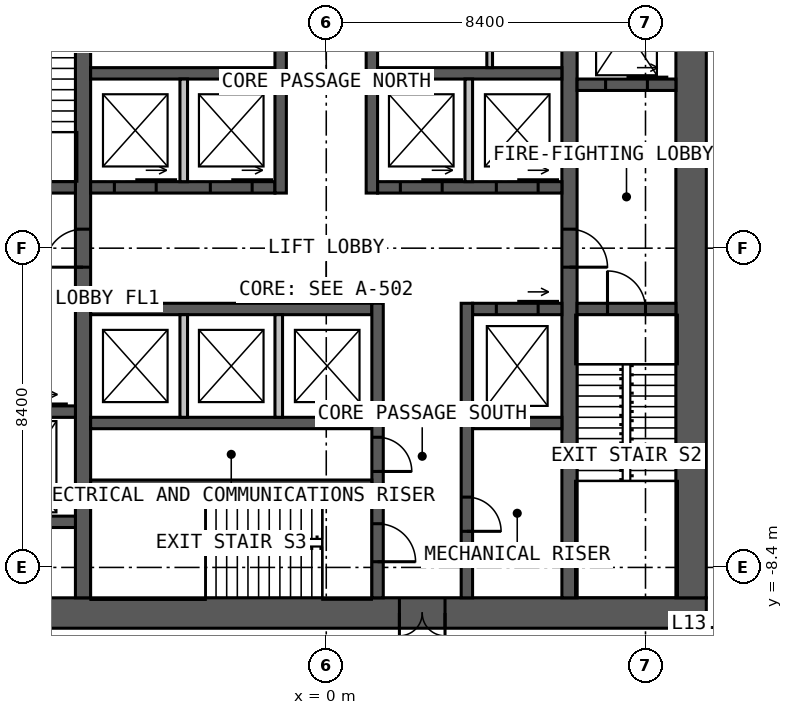
"""IFC4 building model, lengths in metres.
Left out: names, types, materials, properties, quantities, classifications, styles, units other than length and angle.
Written with IfcOpenShell. Run it as: python <this file> out.ifc"""

import sys

from ifc_helpers import new_model, si_unit, direction, frame, frame_2d, origin, place, context, subcontext, project, spatial, rectangle, extrude, element, fill, save


model = new_model("IFC4")
c1 = context("Model", 3, precision=1e-05, world=origin(), true_north=direction((0.0, 1.0)))
c2 = subcontext(c1, "Body", "Model", "MODEL_VIEW")
j1 = project(units=[si_unit("LENGTHUNIT", "METRE"), si_unit("PLANEANGLEUNIT", "RADIAN")], contexts=[c1])
p1 = place(None, origin())
s1 = spatial("IfcSite", under=j1, at=p1, CompositionType="ELEMENT")
p2 = place(p1, origin())
s2 = spatial("IfcBuilding", under=s1, at=p2, CompositionType="ELEMENT")
p3 = place(p2, frame((0.0, 0.0, 57.0)))
s3 = spatial("IfcBuildingStorey", under=s2, at=p3, CompositionType="ELEMENT", Elevation=57.0)
p4 = place(p3, frame((10.0, -9.6, 0.0), z_axis=(0.0, 0.0, 1.0), x_axis=(-1.0, 0.0, 0.0)))
e1 = element("IfcWall", 1, at=p4, inside=s3, PredefinedType="SOLIDWALL", context=c2, shape_type="SweptSolid", body=[
    extrude(rectangle(XDim=20.0, YDim=0.8, at=frame_2d((10.0, 0.0))), origin(), (0.0, 0.0, 1.0), 4.0),
])
p5 = place(p4, frame((6.875, 0.0, 0.0)))
e2 = element("IfcOpeningElement", 2, at=p5, cuts=e1, PredefinedType="OPENING", context=c2, shape_type="SweptSolid", body=[
    extrude(rectangle(XDim=1.2, YDim=2.2, at=frame_2d((0.6, 1.1))), frame((0.0, 0.41, 0.0), z_axis=(0.0, -1.0, 0.0), x_axis=(1.0, 0.0, 0.0)), (0.0, 0.0, 1.0), 0.82),
])
p6 = place(p3, frame((9.6, -9.2, 0.0), z_axis=(0.0, 0.0, 1.0), x_axis=(0.0, 1.0, 0.0)))
e3 = element("IfcWall", 3, at=p6, inside=s3, PredefinedType="SOLIDWALL", context=c2, shape_type="SweptSolid", body=[
    extrude(rectangle(XDim=18.4, YDim=0.8, at=frame_2d((9.2, 0.0))), origin(), (0.0, 0.0, 1.0), 4.0),
])
p7 = place(p3, frame((-6.4, -9.2, 0.0), z_axis=(0.0, 0.0, 1.0), x_axis=(0.0, 1.0, 0.0)))
e4 = element("IfcWall", 4, at=p7, inside=s3, PredefinedType="SOLIDWALL", context=c2, shape_type="SweptSolid", body=[
    extrude(rectangle(XDim=18.4, YDim=0.4, at=frame_2d((9.2, 0.0))), origin(), (0.0, 0.0, 1.0), 4.0),
])
p8 = place(p7, frame((8.7, 0.0, 0.0)))
e5 = element("IfcOpeningElement", 5, at=p8, cuts=e4, PredefinedType="OPENING", context=c2, shape_type="SweptSolid", body=[
    extrude(rectangle(XDim=1.0, YDim=2.2, at=frame_2d((0.5, 1.1))), frame((0.0, 0.21, 0.0), z_axis=(0.0, -1.0, 0.0), x_axis=(1.0, 0.0, 0.0)), (0.0, 0.0, 1.0), 0.42),
])
p9 = place(p3, frame((6.4, 9.2, 0.0), z_axis=(0.0, 0.0, 1.0), x_axis=(0.0, -1.0, 0.0)))
e6 = element("IfcWall", 6, at=p9, inside=s3, PredefinedType="SOLIDWALL", context=c2, shape_type="SweptSolid", body=[
    extrude(rectangle(XDim=18.4, YDim=0.4, at=frame_2d((9.2, 0.0))), origin(), (0.0, 0.0, 1.0), 4.0),
])
p10 = place(p9, frame((8.7, 0.0, 0.0)))
e7 = element("IfcOpeningElement", 7, at=p10, cuts=e6, PredefinedType="OPENING", context=c2, shape_type="SweptSolid", body=[
    extrude(rectangle(XDim=1.0, YDim=2.2, at=frame_2d((0.5, 1.1))), frame((0.0, 0.21, 0.0), z_axis=(0.0, -1.0, 0.0), x_axis=(1.0, 0.0, 0.0)), (0.0, 0.0, 1.0), 0.42),
])
p11 = place(p3, frame((-6.2, 1.6, 0.0), z_axis=(0.0, 0.0, 1.0), x_axis=(1.0, 0.0, 0.0)))
e8 = element("IfcWall", 8, at=p11, inside=s3, PredefinedType="SOLIDWALL", context=c2, shape_type="SweptSolid", body=[
    extrude(rectangle(XDim=4.85, YDim=0.3, at=frame_2d((2.425, 0.0))), origin(), (0.0, 0.0, 1.0), 4.0),
])
p12 = place(p11, frame((0.625, 0.0, 0.0)))
e9 = element("IfcOpeningElement", 9, at=p12, cuts=e8, PredefinedType="OPENING", context=c2, shape_type="SweptSolid", body=[
    extrude(rectangle(XDim=1.1, YDim=2.2, at=frame_2d((0.55, 1.1))), frame((0.0, 0.16, 0.0), z_axis=(0.0, -1.0, 0.0), x_axis=(1.0, 0.0, 0.0)), (0.0, 0.0, 1.0), 0.32),
])
p13 = place(p11, frame((3.15, 0.0, 0.0)))
e10 = element("IfcOpeningElement", 10, at=p13, cuts=e8, PredefinedType="OPENING", context=c2, shape_type="SweptSolid", body=[
    extrude(rectangle(XDim=1.1, YDim=2.2, at=frame_2d((0.55, 1.1))), frame((0.0, 0.16, 0.0), z_axis=(0.0, -1.0, 0.0), x_axis=(1.0, 0.0, 0.0)), (0.0, 0.0, 1.0), 0.32),
])
p14 = place(p3, frame((1.35, 1.6, 0.0), z_axis=(0.0, 0.0, 1.0), x_axis=(1.0, 0.0, 0.0)))
e11 = element("IfcWall", 11, at=p14, inside=s3, PredefinedType="SOLIDWALL", context=c2, shape_type="SweptSolid", body=[
    extrude(rectangle(XDim=4.85, YDim=0.3, at=frame_2d((2.425, 0.0))), origin(), (0.0, 0.0, 1.0), 4.0),
])
p15 = place(p14, frame((0.6, 0.0, 0.0)))
e12 = element("IfcOpeningElement", 12, at=p15, cuts=e11, PredefinedType="OPENING", context=c2, shape_type="SweptSolid", body=[
    extrude(rectangle(XDim=1.1, YDim=2.2, at=frame_2d((0.55, 1.1))), frame((0.0, 0.16, 0.0), z_axis=(0.0, -1.0, 0.0), x_axis=(1.0, 0.0, 0.0)), (0.0, 0.0, 1.0), 0.32),
])
p16 = place(p14, frame((3.125, 0.0, 0.0)))
e13 = element("IfcOpeningElement", 13, at=p16, cuts=e11, PredefinedType="OPENING", context=c2, shape_type="SweptSolid", body=[
    extrude(rectangle(XDim=1.1, YDim=2.2, at=frame_2d((0.55, 1.1))), frame((0.0, 0.16, 0.0), z_axis=(0.0, -1.0, 0.0), x_axis=(1.0, 0.0, 0.0)), (0.0, 0.0, 1.0), 0.32),
])
for number, where, z_axis, x_axis in (
    (14, (-6.2, 4.6, 0.0), (0.0, 0.0, 1.0), (1.0, 0.0, 0.0)),
    (15, (1.35, 4.6, 0.0), (0.0, 0.0, 1.0), (1.0, 0.0, 0.0)),
):
    element("IfcWall", number, at=place(p3, frame(where, z_axis=z_axis, x_axis=x_axis)), inside=s3, PredefinedType="SOLIDWALL", context=c2, shape_type="SweptSolid", body=[
        extrude(rectangle(XDim=4.85, YDim=0.3, at=frame_2d((2.425, 0.0))), origin(), (0.0, 0.0, 1.0), 4.0),
    ])
p17 = place(p3, frame((-1.2, 1.45, 0.0), z_axis=(0.0, 0.0, 1.0), x_axis=(0.0, 1.0, 0.0)))
e16 = element("IfcWall", 16, at=p17, inside=s3, PredefinedType="SOLIDWALL", context=c2, shape_type="SweptSolid", body=[
    extrude(rectangle(XDim=7.75, YDim=0.3, at=frame_2d((3.875, 0.0))), origin(), (0.0, 0.0, 1.0), 4.0),
])
p18 = place(p17, frame((5.05, 0.0, 0.0)))
e17 = element("IfcOpeningElement", 17, at=p18, cuts=e16, PredefinedType="OPENING", context=c2, shape_type="SweptSolid", body=[
    extrude(rectangle(XDim=1.0, YDim=2.2, at=frame_2d((0.5, 1.1))), frame((0.0, 0.16, 0.0), z_axis=(0.0, -1.0, 0.0), x_axis=(1.0, 0.0, 0.0)), (0.0, 0.0, 1.0), 0.32),
])
p19 = place(p3, frame((1.2, 1.45, 0.0), z_axis=(0.0, 0.0, 1.0), x_axis=(0.0, 1.0, 0.0)))
e18 = element("IfcWall", 18, at=p19, inside=s3, PredefinedType="SOLIDWALL", context=c2, shape_type="SweptSolid", body=[
    extrude(rectangle(XDim=7.75, YDim=0.3, at=frame_2d((3.875, 0.0))), origin(), (0.0, 0.0, 1.0), 4.0),
])
p20 = place(p19, frame((3.8, 0.0, 0.0)))
e19 = element("IfcOpeningElement", 19, at=p20, cuts=e18, PredefinedType="OPENING", context=c2, shape_type="SweptSolid", body=[
    extrude(rectangle(XDim=1.0, YDim=2.2, at=frame_2d((0.5, 1.1))), frame((0.0, 0.16, 0.0), z_axis=(0.0, -1.0, 0.0), x_axis=(1.0, 0.0, 0.0)), (0.0, 0.0, 1.0), 0.32),
])
p21 = place(p19, frame((6.15, 0.0, 0.0)))
e20 = element("IfcOpeningElement", 20, at=p21, cuts=e18, PredefinedType="OPENING", context=c2, shape_type="SweptSolid", body=[
    extrude(rectangle(XDim=1.0, YDim=2.2, at=frame_2d((0.5, 1.1))), frame((0.0, 0.16, 0.0), z_axis=(0.0, -1.0, 0.0), x_axis=(1.0, 0.0, 0.0)), (0.0, 0.0, 1.0), 0.32),
])
p22 = place(p3, frame((-6.2, -1.6, 0.0), z_axis=(0.0, 0.0, 1.0), x_axis=(1.0, 0.0, 0.0)))
e21 = element("IfcWall", 21, at=p22, inside=s3, PredefinedType="SOLIDWALL", context=c2, shape_type="SweptSolid", body=[
    extrude(rectangle(XDim=7.4, YDim=0.3, at=frame_2d((3.7, 0.0))), origin(), (0.0, 0.0, 1.0), 4.0),
])
p23 = place(p3, frame((3.85, -1.6, 0.0), z_axis=(0.0, 0.0, 1.0), x_axis=(1.0, 0.0, 0.0)))
e22 = element("IfcWall", 22, at=p23, inside=s3, PredefinedType="SOLIDWALL", context=c2, shape_type="SweptSolid", body=[
    extrude(rectangle(XDim=2.35, YDim=0.3, at=frame_2d((1.175, 0.0))), origin(), (0.0, 0.0, 1.0), 4.0),
])
p24 = place(p23, frame((0.625, 0.0, 0.0)))
e23 = element("IfcOpeningElement", 23, at=p24, cuts=e22, PredefinedType="OPENING", context=c2, shape_type="SweptSolid", body=[
    extrude(rectangle(XDim=1.1, YDim=2.2, at=frame_2d((0.55, 1.1))), frame((0.0, 0.16, 0.0), z_axis=(0.0, -1.0, 0.0), x_axis=(1.0, 0.0, 0.0)), (0.0, 0.0, 1.0), 0.32),
])
p25 = place(p3, frame((-6.2, -4.6, 0.0), z_axis=(0.0, 0.0, 1.0), x_axis=(1.0, 0.0, 0.0)))
e24 = element("IfcWall", 24, at=p25, inside=s3, PredefinedType="SOLIDWALL", context=c2, shape_type="SweptSolid", body=[
    extrude(rectangle(XDim=7.4, YDim=0.3, at=frame_2d((3.7, 0.0))), origin(), (0.0, 0.0, 1.0), 4.0),
])
p26 = place(p3, frame((3.85, -4.6, 0.0), z_axis=(0.0, 0.0, 1.0), x_axis=(1.0, 0.0, 0.0)))
e25 = element("IfcWall", 25, at=p26, inside=s3, PredefinedType="SOLIDWALL", context=c2, shape_type="SweptSolid", body=[
    extrude(rectangle(XDim=2.35, YDim=0.3, at=frame_2d((1.175, 0.0))), origin(), (0.0, 0.0, 1.0), 4.0),
])
p27 = place(p3, frame((1.35, -1.45, 0.0), z_axis=(0.0, 0.0, 1.0), x_axis=(0.0, -1.0, 0.0)))
e26 = element("IfcWall", 26, at=p27, inside=s3, PredefinedType="SOLIDWALL", context=c2, shape_type="SweptSolid", body=[
    extrude(rectangle(XDim=7.75, YDim=0.3, at=frame_2d((3.875, 0.0))), origin(), (0.0, 0.0, 1.0), 4.0),
])
p28 = place(p27, frame((5.8, 0.0, 0.0)))
e27 = element("IfcOpeningElement", 27, at=p28, cuts=e26, PredefinedType="OPENING", context=c2, shape_type="SweptSolid", body=[
    extrude(rectangle(XDim=1.0, YDim=2.2, at=frame_2d((0.5, 1.1))), frame((0.0, 0.16, 0.0), z_axis=(0.0, -1.0, 0.0), x_axis=(1.0, 0.0, 0.0)), (0.0, 0.0, 1.0), 0.32),
])
p29 = place(p27, frame((3.525, 0.0, 0.0)))
e28 = element("IfcOpeningElement", 28, at=p29, cuts=e26, PredefinedType="OPENING", context=c2, shape_type="SweptSolid", body=[
    extrude(rectangle(XDim=0.9, YDim=2.2, at=frame_2d((0.45, 1.1))), frame((0.0, 0.16, 0.0), z_axis=(0.0, -1.0, 0.0), x_axis=(1.0, 0.0, 0.0)), (0.0, 0.0, 1.0), 0.32),
])
p30 = place(p3, frame((3.7, -1.45, 0.0), z_axis=(0.0, 0.0, 1.0), x_axis=(0.0, -1.0, 0.0)))
e29 = element("IfcWall", 29, at=p30, inside=s3, PredefinedType="SOLIDWALL", context=c2, shape_type="SweptSolid", body=[
    extrude(rectangle(XDim=7.75, YDim=0.3, at=frame_2d((3.875, 0.0))), origin(), (0.0, 0.0, 1.0), 4.0),
])
p31 = place(p30, frame((5.1, 0.0, 0.0)))
e30 = element("IfcOpeningElement", 30, at=p31, cuts=e29, PredefinedType="OPENING", context=c2, shape_type="SweptSolid", body=[
    extrude(rectangle(XDim=0.9, YDim=2.2, at=frame_2d((0.45, 1.1))), frame((0.0, 0.16, 0.0), z_axis=(0.0, -1.0, 0.0), x_axis=(1.0, 0.0, 0.0)), (0.0, 0.0, 1.0), 0.32),
])
p32 = place(p3, frame((-6.2, -6.2, 0.0), z_axis=(0.0, 0.0, 1.0), x_axis=(1.0, 0.0, 0.0)))
e31 = element("IfcWall", 31, at=p32, inside=s3, PredefinedType="SOLIDWALL", context=c2, shape_type="SweptSolid", body=[
    extrude(rectangle(XDim=7.4, YDim=0.2, at=frame_2d((3.7, 0.0))), origin(), (0.0, 0.0, 1.0), 4.0),
])
p33 = place(p3, frame((-9.2, 1.6, 0.0), z_axis=(0.0, 0.0, 1.0), x_axis=(1.0, 0.0, 0.0)))
e32 = element("IfcWall", 32, at=p33, inside=s3, PredefinedType="SOLIDWALL", context=c2, shape_type="SweptSolid", body=[
    extrude(rectangle(XDim=2.6, YDim=0.3, at=frame_2d((1.3, 0.0))), origin(), (0.0, 0.0, 1.0), 4.0),
])
p34 = place(p33, frame((0.8, 0.0, 0.0)))
e33 = element("IfcOpeningElement", 33, at=p34, cuts=e32, PredefinedType="OPENING", context=c2, shape_type="SweptSolid", body=[
    extrude(rectangle(XDim=1.0, YDim=2.2, at=frame_2d((0.5, 1.1))), frame((0.0, 0.16, 0.0), z_axis=(0.0, -1.0, 0.0), x_axis=(1.0, 0.0, 0.0)), (0.0, 0.0, 1.0), 0.32),
])
p35 = place(p3, frame((6.6, -1.6, 0.0), z_axis=(0.0, 0.0, 1.0), x_axis=(1.0, 0.0, 0.0)))
e34 = element("IfcWall", 34, at=p35, inside=s3, PredefinedType="SOLIDWALL", context=c2, shape_type="SweptSolid", body=[
    extrude(rectangle(XDim=2.6, YDim=0.3, at=frame_2d((1.3, 0.0))), origin(), (0.0, 0.0, 1.0), 4.0),
])
p36 = place(p35, frame((0.8, 0.0, 0.0)))
e35 = element("IfcOpeningElement", 35, at=p36, cuts=e34, PredefinedType="OPENING", context=c2, shape_type="SweptSolid", body=[
    extrude(rectangle(XDim=1.0, YDim=2.2, at=frame_2d((0.5, 1.1))), frame((0.0, 0.16, 0.0), z_axis=(0.0, -1.0, 0.0), x_axis=(1.0, 0.0, 0.0)), (0.0, 0.0, 1.0), 0.32),
])
p37 = place(p3, frame((-9.2, -4.3, 0.0), z_axis=(0.0, 0.0, 1.0), x_axis=(1.0, 0.0, 0.0)))
e36 = element("IfcWall", 36, at=p37, inside=s3, PredefinedType="SOLIDWALL", context=c2, shape_type="SweptSolid", body=[
    extrude(rectangle(XDim=2.6, YDim=0.3, at=frame_2d((1.3, 0.0))), origin(), (0.0, 0.0, 1.0), 4.0),
])
p38 = place(p37, frame((0.75, 0.0, 0.0)))
e37 = element("IfcOpeningElement", 37, at=p38, cuts=e36, PredefinedType="OPENING", context=c2, shape_type="SweptSolid", body=[
    extrude(rectangle(XDim=1.1, YDim=2.2, at=frame_2d((0.55, 1.1))), frame((0.0, 0.16, 0.0), z_axis=(0.0, -1.0, 0.0), x_axis=(1.0, 0.0, 0.0)), (0.0, 0.0, 1.0), 0.32),
])
p39 = place(p3, frame((6.6, 4.3, 0.0), z_axis=(0.0, 0.0, 1.0), x_axis=(1.0, 0.0, 0.0)))
e38 = element("IfcWall", 38, at=p39, inside=s3, PredefinedType="SOLIDWALL", context=c2, shape_type="SweptSolid", body=[
    extrude(rectangle(XDim=2.6, YDim=0.3, at=frame_2d((1.3, 0.0))), origin(), (0.0, 0.0, 1.0), 4.0),
])
p40 = place(p39, frame((0.75, 0.0, 0.0)))
e39 = element("IfcOpeningElement", 39, at=p40, cuts=e38, PredefinedType="OPENING", context=c2, shape_type="SweptSolid", body=[
    extrude(rectangle(XDim=1.1, YDim=2.2, at=frame_2d((0.55, 1.1))), frame((0.0, 0.16, 0.0), z_axis=(0.0, -1.0, 0.0), x_axis=(1.0, 0.0, 0.0)), (0.0, 0.0, 1.0), 0.32),
])
p41 = place(p3, frame((-9.2, -7.2, 0.0), z_axis=(0.0, 0.0, 1.0), x_axis=(1.0, 0.0, 0.0)))
e40 = element("IfcWall", 40, at=p41, inside=s3, PredefinedType="SOLIDWALL", context=c2, shape_type="SweptSolid", body=[
    extrude(rectangle(XDim=2.6, YDim=0.3, at=frame_2d((1.3, 0.0))), origin(), (0.0, 0.0, 1.0), 4.0),
])
for number, where, z_axis, x_axis in (
    (41, (-3.75, 1.75, 0.0), (0.0, 0.0, 1.0), (0.0, 1.0, 0.0)),
    (42, (3.75, 1.75, 0.0), (0.0, 0.0, 1.0), (0.0, 1.0, 0.0)),
    (43, (-3.75, -1.75, 0.0), (0.0, 0.0, 1.0), (0.0, -1.0, 0.0)),
    (44, (-1.25, -1.75, 0.0), (0.0, 0.0, 1.0), (0.0, -1.0, 0.0)),
):
    element("IfcWall", number, at=place(p3, frame(where, z_axis=z_axis, x_axis=x_axis)), inside=s3, PredefinedType="SOLIDWALL", context=c2, shape_type="SweptSolid", body=[
        extrude(rectangle(XDim=2.7, YDim=0.2, at=frame_2d((1.35, 0.0))), origin(), (0.0, 0.0, 1.0), 3.75),
    ])
p42 = place(p3, frame((4.3, 4.75, 0.0), z_axis=(0.0, 0.0, 1.0), x_axis=(0.0, 1.0, 0.0)))
e45 = element("IfcWall", 45, at=p42, inside=s3, PredefinedType="PARTITIONING", context=c2, shape_type="SweptSolid", body=[
    extrude(rectangle(XDim=2.375, YDim=0.15, at=frame_2d((1.188, 0.0))), origin(), (0.0, 0.0, 1.0), 3.75),
])
p43 = place(p3, frame((10.0, -10.0, 0.0), z_axis=(0.0, 0.0, 1.0), x_axis=(0.0, -1.0, 0.0)))
e46 = element("IfcWall", 46, at=p43, inside=s3, PredefinedType="PARTITIONING", context=c2, shape_type="SweptSolid", body=[
    extrude(rectangle(XDim=2.0, YDim=0.2, at=frame_2d((1.0, 0.0))), origin(), (0.0, 0.0, 1.0), 3.8),
])
p44 = place(p43, frame((0.5, 0.0, 0.0)))
e47 = element("IfcOpeningElement", 47, at=p44, cuts=e46, PredefinedType="OPENING", context=c2, shape_type="SweptSolid", body=[
    extrude(rectangle(XDim=1.0, YDim=2.2, at=frame_2d((0.5, 1.1))), frame((0.0, 0.11, 0.0), z_axis=(0.0, -1.0, 0.0), x_axis=(1.0, 0.0, 0.0)), (0.0, 0.0, 1.0), 0.22),
])
p45 = place(p5, origin())
e48 = element("IfcDoor", 48, at=p45, inside=s3, OperationType="DOUBLE_DOOR_SINGLE_SWING", PredefinedType="DOOR", context=c2, shape_type="SweptSolid", body=[
    extrude(rectangle(XDim=1.2, YDim=2.2, at=frame_2d((0.6, 1.1))), frame((0.0, 0.025, 0.0), z_axis=(0.0, -1.0, 0.0), x_axis=(1.0, 0.0, 0.0)), (0.0, 0.0, 1.0), 0.05),
])
fill(e2, e48)
p46 = place(p8, origin())
e49 = element("IfcDoor", 49, at=p46, inside=s3, OperationType="SINGLE_SWING_LEFT", PredefinedType="DOOR", context=c2, shape_type="SweptSolid", body=[
    extrude(rectangle(XDim=1.0, YDim=2.2, at=frame_2d((0.5, 1.1))), frame((0.0, 0.025, 0.0), z_axis=(0.0, -1.0, 0.0), x_axis=(1.0, 0.0, 0.0)), (0.0, 0.0, 1.0), 0.05),
])
fill(e5, e49)
p47 = place(p10, origin())
e50 = element("IfcDoor", 50, at=p47, inside=s3, OperationType="SINGLE_SWING_RIGHT", PredefinedType="DOOR", context=c2, shape_type="SweptSolid", body=[
    extrude(rectangle(XDim=1.0, YDim=2.2, at=frame_2d((0.5, 1.1))), frame((0.0, 0.025, 0.0), z_axis=(0.0, -1.0, 0.0), x_axis=(1.0, 0.0, 0.0)), (0.0, 0.0, 1.0), 0.05),
])
fill(e7, e50)
p48 = place(p36, origin())
e51 = element("IfcDoor", 51, at=p48, inside=s3, OperationType="SINGLE_SWING_LEFT", PredefinedType="DOOR", context=c2, shape_type="SweptSolid", body=[
    extrude(rectangle(XDim=1.0, YDim=2.2, at=frame_2d((0.5, 1.1))), frame((0.0, 0.025, 0.0), z_axis=(0.0, -1.0, 0.0), x_axis=(1.0, 0.0, 0.0)), (0.0, 0.0, 1.0), 0.05),
])
fill(e35, e51)
p49 = place(p28, origin())
e52 = element("IfcDoor", 52, at=p49, inside=s3, OperationType="SINGLE_SWING_RIGHT", PredefinedType="DOOR", context=c2, shape_type="SweptSolid", body=[
    extrude(rectangle(XDim=1.0, YDim=2.2, at=frame_2d((0.5, 1.1))), frame((0.0, 0.025, 0.0), z_axis=(0.0, -1.0, 0.0), x_axis=(1.0, 0.0, 0.0)), (0.0, 0.0, 1.0), 0.05),
])
fill(e27, e52)
p50 = place(p29, origin())
e53 = element("IfcDoor", 53, at=p50, inside=s3, OperationType="SINGLE_SWING_RIGHT", PredefinedType="DOOR", context=c2, shape_type="SweptSolid", body=[
    extrude(rectangle(XDim=0.9, YDim=2.2, at=frame_2d((0.45, 1.1))), frame((0.0, 0.025, 0.0), z_axis=(0.0, -1.0, 0.0), x_axis=(1.0, 0.0, 0.0)), (0.0, 0.0, 1.0), 0.05),
])
fill(e28, e53)
p51 = place(p31, origin())
e54 = element("IfcDoor", 54, at=p51, inside=s3, OperationType="SINGLE_SWING_RIGHT", PredefinedType="DOOR", context=c2, shape_type="SweptSolid", body=[
    extrude(rectangle(XDim=0.9, YDim=2.2, at=frame_2d((0.45, 1.1))), frame((0.0, 0.025, 0.0), z_axis=(0.0, -1.0, 0.0), x_axis=(1.0, 0.0, 0.0)), (0.0, 0.0, 1.0), 0.05),
])
fill(e30, e54)
p52 = place(p12, origin())
e55 = element("IfcDoor", 55, at=p52, inside=s3, OperationType="SLIDING_TO_LEFT", PredefinedType="DOOR", context=c2, shape_type="SweptSolid", body=[
    extrude(rectangle(XDim=1.1, YDim=2.2, at=frame_2d((0.55, 1.1))), frame((0.0, 0.025, 0.0), z_axis=(0.0, -1.0, 0.0), x_axis=(1.0, 0.0, 0.0)), (0.0, 0.0, 1.0), 0.05),
])
fill(e9, e55)
p53 = place(p13, origin())
e56 = element("IfcDoor", 56, at=p53, inside=s3, OperationType="SLIDING_TO_LEFT", PredefinedType="DOOR", context=c2, shape_type="SweptSolid", body=[
    extrude(rectangle(XDim=1.1, YDim=2.2, at=frame_2d((0.55, 1.1))), frame((0.0, 0.025, 0.0), z_axis=(0.0, -1.0, 0.0), x_axis=(1.0, 0.0, 0.0)), (0.0, 0.0, 1.0), 0.05),
])
fill(e10, e56)
p54 = place(p15, origin())
e57 = element("IfcDoor", 57, at=p54, inside=s3, OperationType="SLIDING_TO_LEFT", PredefinedType="DOOR", context=c2, shape_type="SweptSolid", body=[
    extrude(rectangle(XDim=1.1, YDim=2.2, at=frame_2d((0.55, 1.1))), frame((0.0, 0.025, 0.0), z_axis=(0.0, -1.0, 0.0), x_axis=(1.0, 0.0, 0.0)), (0.0, 0.0, 1.0), 0.05),
])
fill(e12, e57)
p55 = place(p16, origin())
e58 = element("IfcDoor", 58, at=p55, inside=s3, OperationType="SLIDING_TO_LEFT", PredefinedType="DOOR", context=c2, shape_type="SweptSolid", body=[
    extrude(rectangle(XDim=1.1, YDim=2.2, at=frame_2d((0.55, 1.1))), frame((0.0, 0.025, 0.0), z_axis=(0.0, -1.0, 0.0), x_axis=(1.0, 0.0, 0.0)), (0.0, 0.0, 1.0), 0.05),
])
fill(e13, e58)
p56 = place(p24, origin())
e59 = element("IfcDoor", 59, at=p56, inside=s3, OperationType="SLIDING_TO_LEFT", PredefinedType="DOOR", context=c2, shape_type="SweptSolid", body=[
    extrude(rectangle(XDim=1.1, YDim=2.2, at=frame_2d((0.55, 1.1))), frame((0.0, 0.025, 0.0), z_axis=(0.0, -1.0, 0.0), x_axis=(1.0, 0.0, 0.0)), (0.0, 0.0, 1.0), 0.05),
])
fill(e23, e59)
p57 = place(p40, origin())
e60 = element("IfcDoor", 60, at=p57, inside=s3, OperationType="SLIDING_TO_LEFT", PredefinedType="DOOR", context=c2, shape_type="SweptSolid", body=[
    extrude(rectangle(XDim=1.1, YDim=2.2, at=frame_2d((0.55, 1.1))), frame((0.0, 0.025, 0.0), z_axis=(0.0, -1.0, 0.0), x_axis=(1.0, 0.0, 0.0)), (0.0, 0.0, 1.0), 0.05),
])
fill(e39, e60)
save(model, sys.argv[1])
